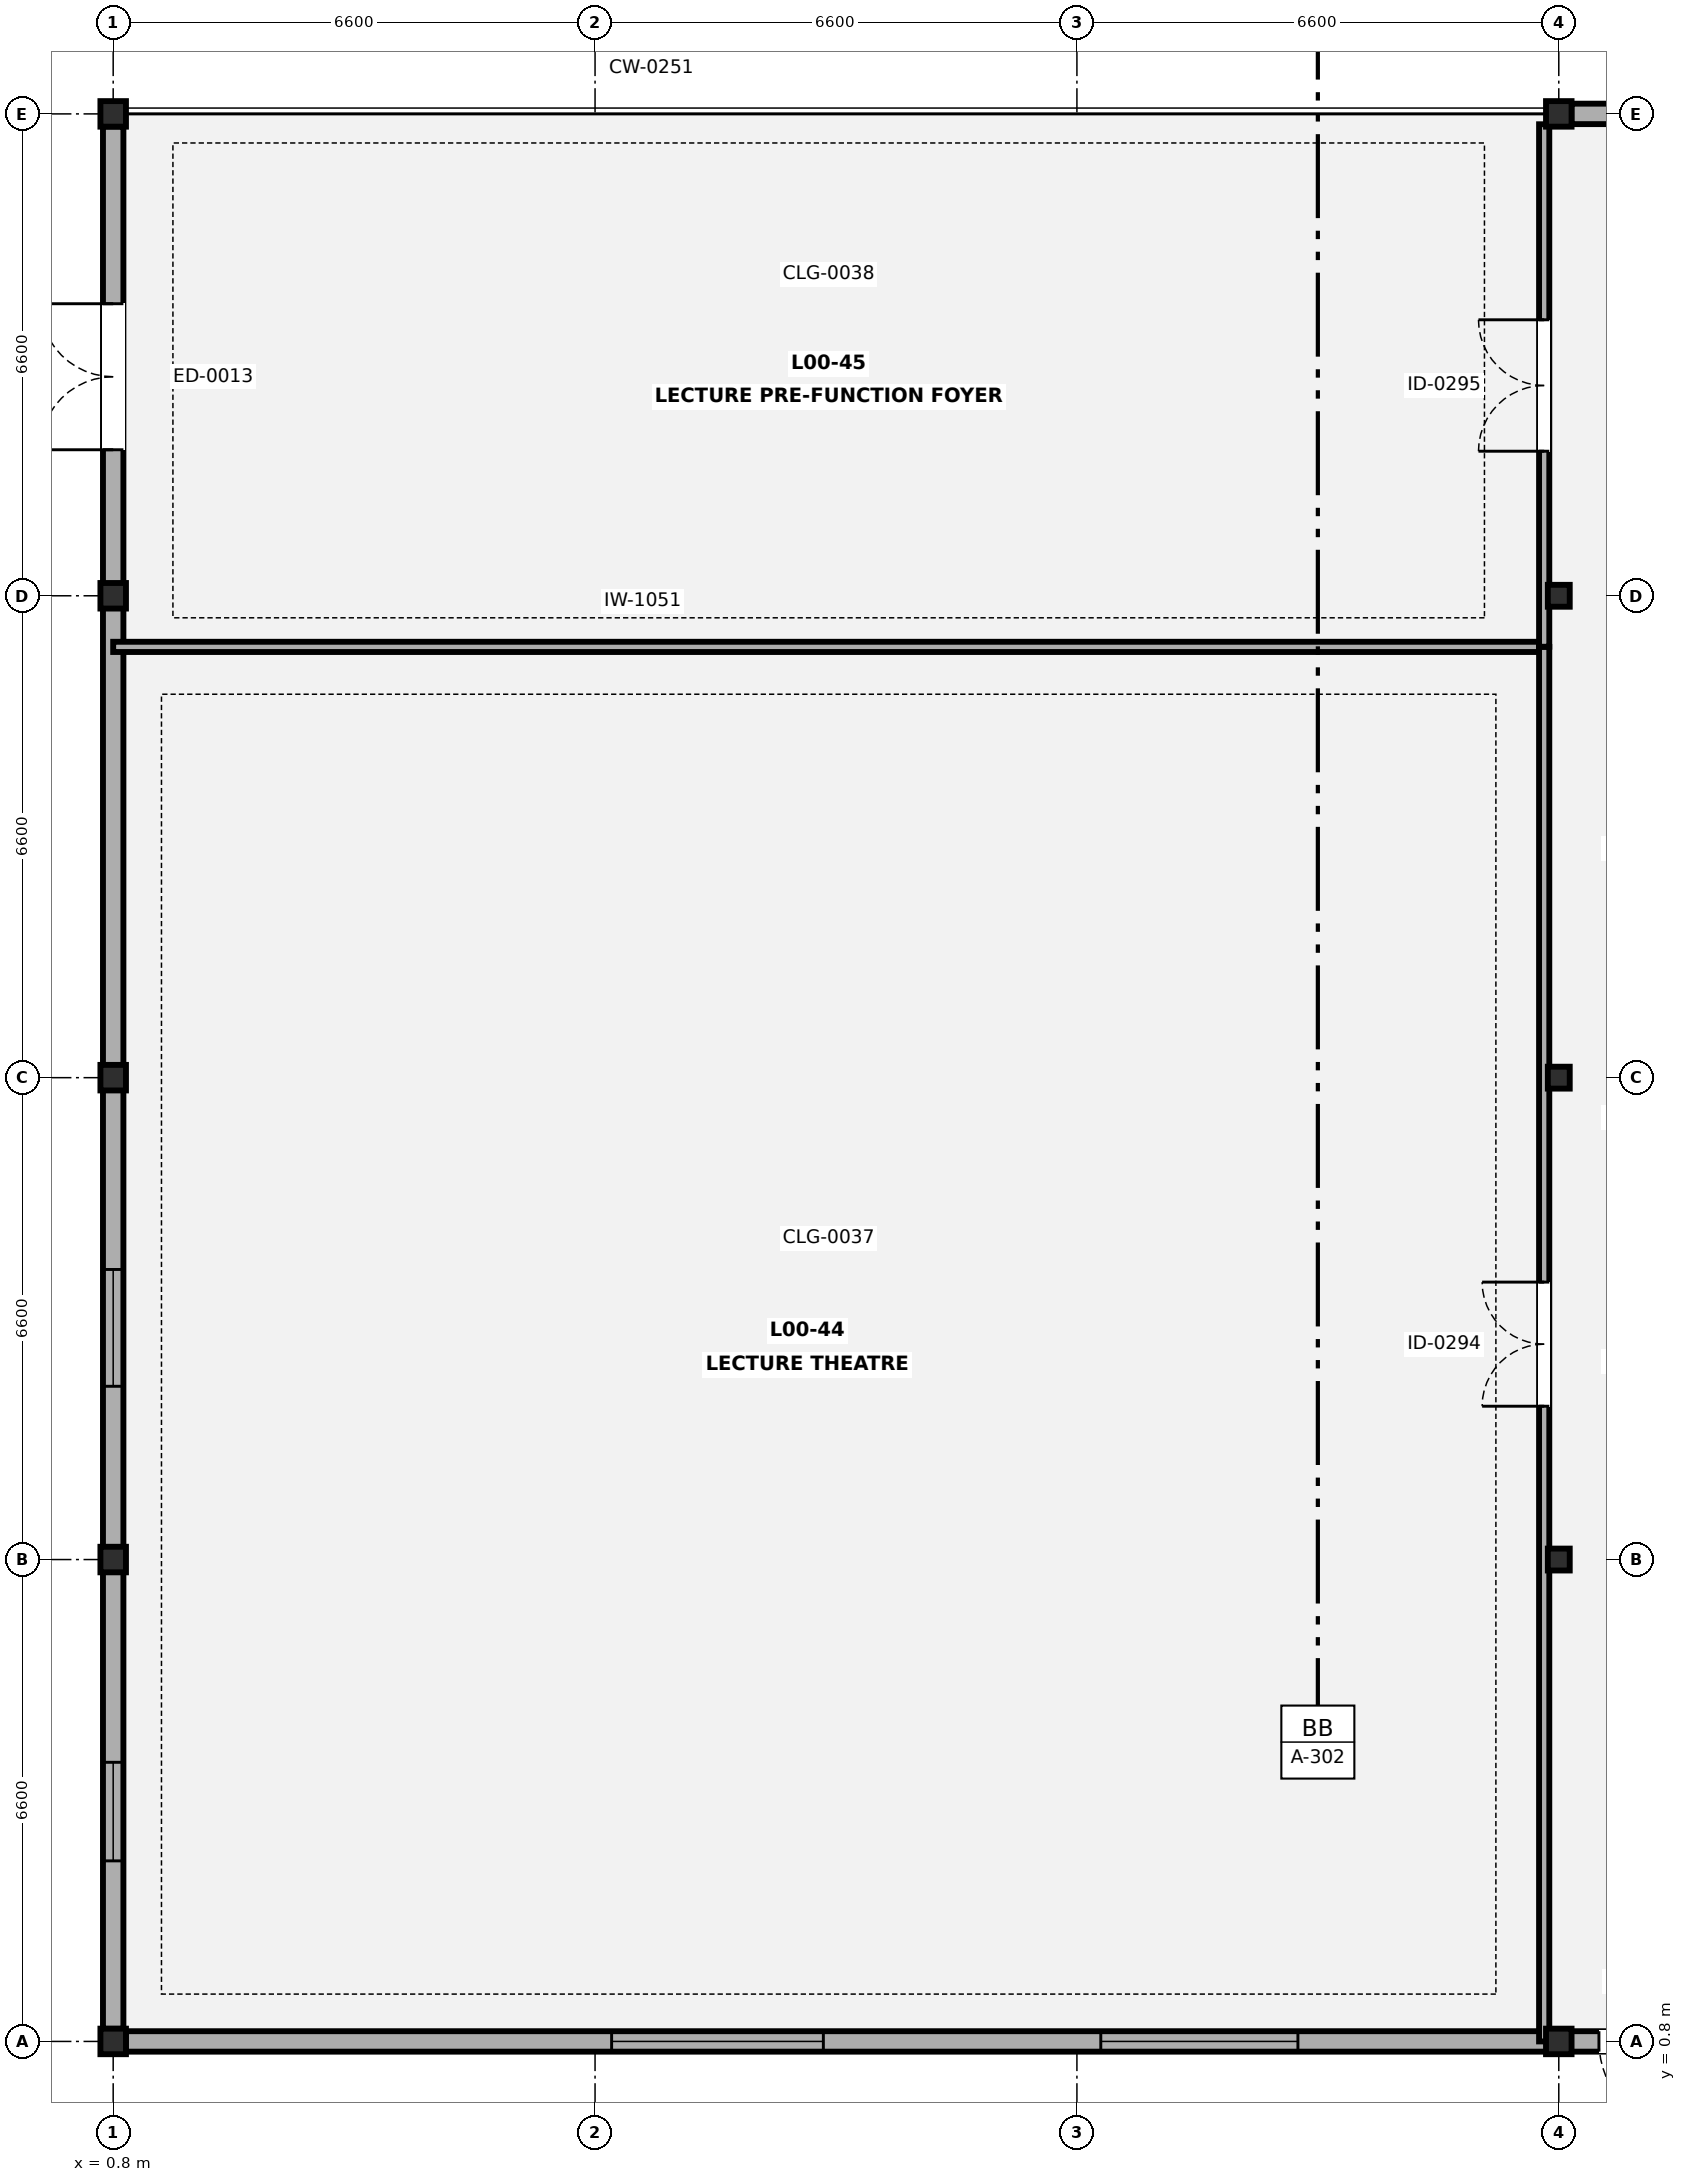
"""IFC4 building model, lengths in metres.
Left out: names, types, materials, properties, quantities, classifications, styles, units other than length and angle.
Written with IfcOpenShell. Run it as: python <this file> out.ifc"""

import sys

from ifc_helpers import new_model, si_unit, direction, frame, frame_2d, origin, origin_2d, place, context, subcontext, project, spatial, rectangle, hollow_rectangle, i_section, extrude, element, fill, save


model = new_model("IFC4")
c1 = context("Model", 3, precision=1e-05, world=origin(), true_north=direction((0.0, 1.0)))
c2 = subcontext(c1, "Body", "Model", "MODEL_VIEW")
j1 = project(units=[si_unit("LENGTHUNIT", "METRE"), si_unit("PLANEANGLEUNIT", "RADIAN")], contexts=[c1])
p1 = place(None, origin())
s1 = spatial("IfcSite", under=j1, at=p1, CompositionType="ELEMENT")
p2 = place(p1, origin())
s2 = spatial("IfcBuilding", under=s1, at=p2, CompositionType="ELEMENT")
p3 = place(p2, origin())
s3 = spatial("IfcBuildingStorey", under=s2, at=p3, CompositionType="ELEMENT", Elevation=0.0)
for number, where, z_axis, x_axis in (
    (1, (0.8, 0.8, 0.0), (0.0, 0.0, 1.0), (1.0, 0.0, 0.0)),
    (2, (0.8, 7.4, 0.0), (0.0, 0.0, 1.0), (1.0, 0.0, 0.0)),
    (3, (0.8, 14.0, 0.0), (0.0, 0.0, 1.0), (1.0, 0.0, 0.0)),
    (4, (0.8, 20.6, 0.0), (0.0, 0.0, 1.0), (1.0, 0.0, 0.0)),
    (5, (0.8, 27.2, 0.0), (0.0, 0.0, 1.0), (1.0, 0.0, 0.0)),
    (6, (20.6, 0.8, 0.0), (0.0, 0.0, 1.0), (1.0, 0.0, 0.0)),
):
    element("IfcColumn", number, at=place(p3, frame(where, z_axis=z_axis, x_axis=x_axis)), inside=s3, PredefinedType="COLUMN", context=c2, shape_type="SweptSolid", body=[
        extrude(i_section(OverallWidth=0.35, OverallDepth=0.35, WebThickness=0.02, FlangeThickness=0.032, FilletRadius=0.016, at=origin_2d()), origin(), (0.0, 0.0, 1.0), 4.9),
    ])
for number, where, z_axis, x_axis in (
    (7, (20.6, 7.4, 0.0), (0.0, 0.0, 1.0), (1.0, 0.0, 0.0)),
    (8, (20.6, 14.0, 0.0), (0.0, 0.0, 1.0), (1.0, 0.0, 0.0)),
    (9, (20.6, 20.6, 0.0), (0.0, 0.0, 1.0), (1.0, 0.0, 0.0)),
):
    element("IfcColumn", number, at=place(p3, frame(where, z_axis=z_axis, x_axis=x_axis)), inside=s3, PredefinedType="COLUMN", context=c2, shape_type="SweptSolid", body=[
        extrude(hollow_rectangle(XDim=0.3, YDim=0.3, WallThickness=0.012, at=origin_2d()), origin(), (0.0, 0.0, 1.0), 4.9),
    ])
p4 = place(p3, frame((20.6, 27.2, 0.0), z_axis=(0.0, 0.0, 1.0), x_axis=(1.0, 0.0, 0.0)))
e10 = element("IfcColumn", 10, at=p4, inside=s3, PredefinedType="COLUMN", context=c2, shape_type="SweptSolid", body=[
    extrude(i_section(OverallWidth=0.35, OverallDepth=0.35, WebThickness=0.02, FlangeThickness=0.032, FilletRadius=0.016, at=origin_2d()), origin(), (0.0, 0.0, 1.0), 4.9),
])
p5 = place(p3, frame((0.8, 0.973, 0.0), z_axis=(0.0, 0.0, 1.0), x_axis=(0.0, 1.0, 0.0)))
e11 = element("IfcWall", 11, at=p5, inside=s3, PredefinedType="SOLIDWALL", context=c2, shape_type="SweptSolid", body=[
    extrude(rectangle(XDim=26.054, YDim=0.28, at=frame_2d((13.027, 0.0))), origin(), (0.0, 0.0, 1.0), 4.145),
])
p6 = place(p5, frame((21.627, 0.0, 0.0)))
e12 = element("IfcOpeningElement", 12, at=p6, cuts=e11, PredefinedType="OPENING", context=c2, shape_type="SweptSolid", body=[
    extrude(rectangle(XDim=2.0, YDim=2.25, at=frame_2d((1.0, 1.125))), frame((0.0, 0.15, 0.0), z_axis=(0.0, -1.0, 0.0), x_axis=(1.0, 0.0, 0.0)), (0.0, 0.0, 1.0), 0.3),
])
p7 = place(p5, frame((2.3, 0.0, 0.85)))
e13 = element("IfcOpeningElement", 13, at=p7, cuts=e11, PredefinedType="OPENING", context=c2, shape_type="SweptSolid", body=[
    extrude(rectangle(XDim=1.35, YDim=1.5, at=frame_2d((0.675, 0.75))), frame((0.0, 0.15, 0.0), z_axis=(0.0, -1.0, 0.0), x_axis=(1.0, 0.0, 0.0)), (0.0, 0.0, 1.0), 0.3),
])
p8 = place(p5, frame((8.8, 0.0, 0.85)))
e14 = element("IfcOpeningElement", 14, at=p8, cuts=e11, PredefinedType="OPENING", context=c2, shape_type="SweptSolid", body=[
    extrude(rectangle(XDim=1.6, YDim=1.5, at=frame_2d((0.8, 0.75))), frame((0.0, 0.15, 0.0), z_axis=(0.0, -1.0, 0.0), x_axis=(1.0, 0.0, 0.0)), (0.0, 0.0, 1.0), 0.3),
])
p9 = place(p3, frame((20.773, 27.2, 0.0), z_axis=(0.0, 0.0, 1.0), x_axis=(1.0, 0.0, 0.0)))
e15 = element("IfcWall", 15, at=p9, inside=s3, PredefinedType="SOLIDWALL", context=c2, shape_type="SweptSolid", body=[
    extrude(rectangle(XDim=6.254, YDim=0.28, at=frame_2d((3.127, 0.0))), origin(), (0.0, 0.0, 1.0), 4.205),
])
p10 = place(p9, frame((0.577, 0.0, 0.0)))
e16 = element("IfcOpeningElement", 16, at=p10, cuts=e15, PredefinedType="OPENING", context=c2, shape_type="SweptSolid", body=[
    extrude(rectangle(XDim=1.25, YDim=2.15, at=frame_2d((0.625, 1.075))), frame((0.0, 0.15, 0.0), z_axis=(0.0, -1.0, 0.0), x_axis=(1.0, 0.0, 0.0)), (0.0, 0.0, 1.0), 0.3),
])
p11 = place(p3, frame((27.027, 0.8, 0.0), z_axis=(0.0, 0.0, 1.0), x_axis=(-1.0, 0.0, 0.0)))
e17 = element("IfcWall", 17, at=p11, inside=s3, PredefinedType="SOLIDWALL", context=c2, shape_type="SweptSolid", body=[
    extrude(rectangle(XDim=26.054, YDim=0.28, at=frame_2d((13.027, 0.0))), origin(), (0.0, 0.0, 1.0), 4.205),
])
p12 = place(p11, frame((4.627, 0.0, 0.0)))
e18 = element("IfcOpeningElement", 18, at=p12, cuts=e17, PredefinedType="OPENING", context=c2, shape_type="SweptSolid", body=[
    extrude(rectangle(XDim=1.25, YDim=2.15, at=frame_2d((0.625, 1.075))), frame((0.0, 0.15, 0.0), z_axis=(0.0, -1.0, 0.0), x_axis=(1.0, 0.0, 0.0)), (0.0, 0.0, 1.0), 0.3),
])
p13 = place(p11, frame((10.0, 0.0, 0.85)))
e19 = element("IfcOpeningElement", 19, at=p13, cuts=e17, PredefinedType="OPENING", context=c2, shape_type="SweptSolid", body=[
    extrude(rectangle(XDim=2.7, YDim=1.35, at=frame_2d((1.35, 0.675))), frame((0.0, 0.15, 0.0), z_axis=(0.0, -1.0, 0.0), x_axis=(1.0, 0.0, 0.0)), (0.0, 0.0, 1.0), 0.3),
])
p14 = place(p11, frame((16.5, 0.0, 0.85)))
e20 = element("IfcOpeningElement", 20, at=p14, cuts=e17, PredefinedType="OPENING", context=c2, shape_type="SweptSolid", body=[
    extrude(rectangle(XDim=2.9, YDim=1.35, at=frame_2d((1.45, 0.675))), frame((0.0, 0.15, 0.0), z_axis=(0.0, -1.0, 0.0), x_axis=(1.0, 0.0, 0.0)), (0.0, 0.0, 1.0), 0.3),
])
p15 = place(p3, frame((0.8, 19.9, 0.0), z_axis=(0.0, 0.0, 1.0), x_axis=(1.0, 0.0, 0.0)))
e21 = element("IfcWall", 21, at=p15, inside=s3, PredefinedType="PARTITIONING", context=c2, shape_type="SweptSolid", body=[
    extrude(rectangle(XDim=19.6, YDim=0.14, at=frame_2d((9.8, 0.0))), origin(), (0.0, 0.0, 1.0), 4.66),
])
p16 = place(p3, frame((20.4, 0.8, 0.0), z_axis=(0.0, 0.0, 1.0), x_axis=(0.0, 1.0, 0.0)))
e22 = element("IfcWall", 22, at=p16, inside=s3, PredefinedType="PARTITIONING", context=c2, shape_type="SweptSolid", body=[
    extrude(rectangle(XDim=19.1, YDim=0.14, at=frame_2d((9.55, 0.0))), origin(), (0.0, 0.0, 1.0), 4.145),
])
p17 = place(p16, frame((8.7, 0.0, 0.0)))
e23 = element("IfcOpeningElement", 23, at=p17, cuts=e22, PredefinedType="OPENING", context=c2, shape_type="SweptSolid", body=[
    extrude(rectangle(XDim=1.7, YDim=2.2, at=frame_2d((0.85, 1.1))), frame((0.0, 0.08, 0.0), z_axis=(0.0, -1.0, 0.0), x_axis=(1.0, 0.0, 0.0)), (0.0, 0.0, 1.0), 0.16),
])
p18 = place(p3, frame((20.4, 19.902, 0.0), z_axis=(0.0, 0.0, 1.0), x_axis=(0.0, 1.0, 0.0)))
e24 = element("IfcWall", 24, at=p18, inside=s3, PredefinedType="PARTITIONING", context=c2, shape_type="SweptSolid", body=[
    extrude(rectangle(XDim=7.156, YDim=0.14, at=frame_2d((3.578, 0.0))), origin(), (0.0, 0.0, 1.0), 4.145),
])
p19 = place(p18, frame((2.678, 0.0, 0.0)))
e25 = element("IfcOpeningElement", 25, at=p19, cuts=e24, PredefinedType="OPENING", context=c2, shape_type="SweptSolid", body=[
    extrude(rectangle(XDim=1.8, YDim=2.2, at=frame_2d((0.9, 1.1))), frame((0.0, 0.08, 0.0), z_axis=(0.0, -1.0, 0.0), x_axis=(1.0, 0.0, 0.0)), (0.0, 0.0, 1.0), 0.16),
])
p20 = place(p6, origin())
e26 = element("IfcDoor", 26, at=p20, inside=s3, OperationType="DOUBLE_DOOR_SINGLE_SWING", PredefinedType="DOOR", context=c2, shape_type="SweptSolid", body=[
    extrude(rectangle(XDim=2.0, YDim=2.25, at=frame_2d((1.0, 1.125))), frame((0.0, 0.025, 0.0), z_axis=(0.0, -1.0, 0.0), x_axis=(1.0, 0.0, 0.0)), (0.0, 0.0, 1.0), 0.05),
])
fill(e12, e26)
p21 = place(p7, origin())
e27 = element("IfcWindow", 27, at=p21, inside=s3, PartitioningType="SINGLE_PANEL", PredefinedType="WINDOW", context=c2, shape_type="SweptSolid", body=[
    extrude(rectangle(XDim=1.35, YDim=1.5, at=frame_2d((0.675, 0.75))), frame((0.0, 0.03, 0.0), z_axis=(0.0, -1.0, 0.0), x_axis=(1.0, 0.0, 0.0)), (0.0, 0.0, 1.0), 0.06),
])
fill(e13, e27)
p22 = place(p8, origin())
e28 = element("IfcWindow", 28, at=p22, inside=s3, PartitioningType="SINGLE_PANEL", PredefinedType="WINDOW", context=c2, shape_type="SweptSolid", body=[
    extrude(rectangle(XDim=1.6, YDim=1.5, at=frame_2d((0.8, 0.75))), frame((0.0, 0.03, 0.0), z_axis=(0.0, -1.0, 0.0), x_axis=(1.0, 0.0, 0.0)), (0.0, 0.0, 1.0), 0.06),
])
fill(e14, e28)
p23 = place(p12, origin())
e29 = element("IfcDoor", 29, at=p23, inside=s3, OperationType="SINGLE_SWING_LEFT", PredefinedType="DOOR", context=c2, shape_type="SweptSolid", body=[
    extrude(rectangle(XDim=1.25, YDim=2.15, at=frame_2d((0.625, 1.075))), frame((0.0, 0.025, 0.0), z_axis=(0.0, -1.0, 0.0), x_axis=(1.0, 0.0, 0.0)), (0.0, 0.0, 1.0), 0.05),
])
fill(e18, e29)
p24 = place(p13, origin())
e30 = element("IfcWindow", 30, at=p24, inside=s3, PartitioningType="SINGLE_PANEL", PredefinedType="WINDOW", context=c2, shape_type="SweptSolid", body=[
    extrude(rectangle(XDim=2.7, YDim=1.35, at=frame_2d((1.35, 0.675))), frame((0.0, 0.03, 0.0), z_axis=(0.0, -1.0, 0.0), x_axis=(1.0, 0.0, 0.0)), (0.0, 0.0, 1.0), 0.06),
])
fill(e19, e30)
p25 = place(p14, origin())
e31 = element("IfcWindow", 31, at=p25, inside=s3, PartitioningType="SINGLE_PANEL", PredefinedType="WINDOW", context=c2, shape_type="SweptSolid", body=[
    extrude(rectangle(XDim=2.9, YDim=1.35, at=frame_2d((1.45, 0.675))), frame((0.0, 0.03, 0.0), z_axis=(0.0, -1.0, 0.0), x_axis=(1.0, 0.0, 0.0)), (0.0, 0.0, 1.0), 0.06),
])
fill(e20, e31)
p26 = place(p17, origin())
e32 = element("IfcDoor", 32, at=p26, inside=s3, OperationType="DOUBLE_DOOR_SINGLE_SWING", PredefinedType="DOOR", context=c2, shape_type="SweptSolid", body=[
    extrude(rectangle(XDim=1.7, YDim=2.2, at=frame_2d((0.85, 1.1))), frame((0.0, 0.025, 0.0), z_axis=(0.0, -1.0, 0.0), x_axis=(1.0, 0.0, 0.0)), (0.0, 0.0, 1.0), 0.05),
])
fill(e23, e32)
p27 = place(p19, origin())
e33 = element("IfcDoor", 33, at=p27, inside=s3, OperationType="DOUBLE_DOOR_SINGLE_SWING", PredefinedType="DOOR", context=c2, shape_type="SweptSolid", body=[
    extrude(rectangle(XDim=1.8, YDim=2.2, at=frame_2d((0.9, 1.1))), frame((0.0, 0.025, 0.0), z_axis=(0.0, -1.0, 0.0), x_axis=(1.0, 0.0, 0.0)), (0.0, 0.0, 1.0), 0.05),
])
fill(e25, e33)
save(model, sys.argv[1])
